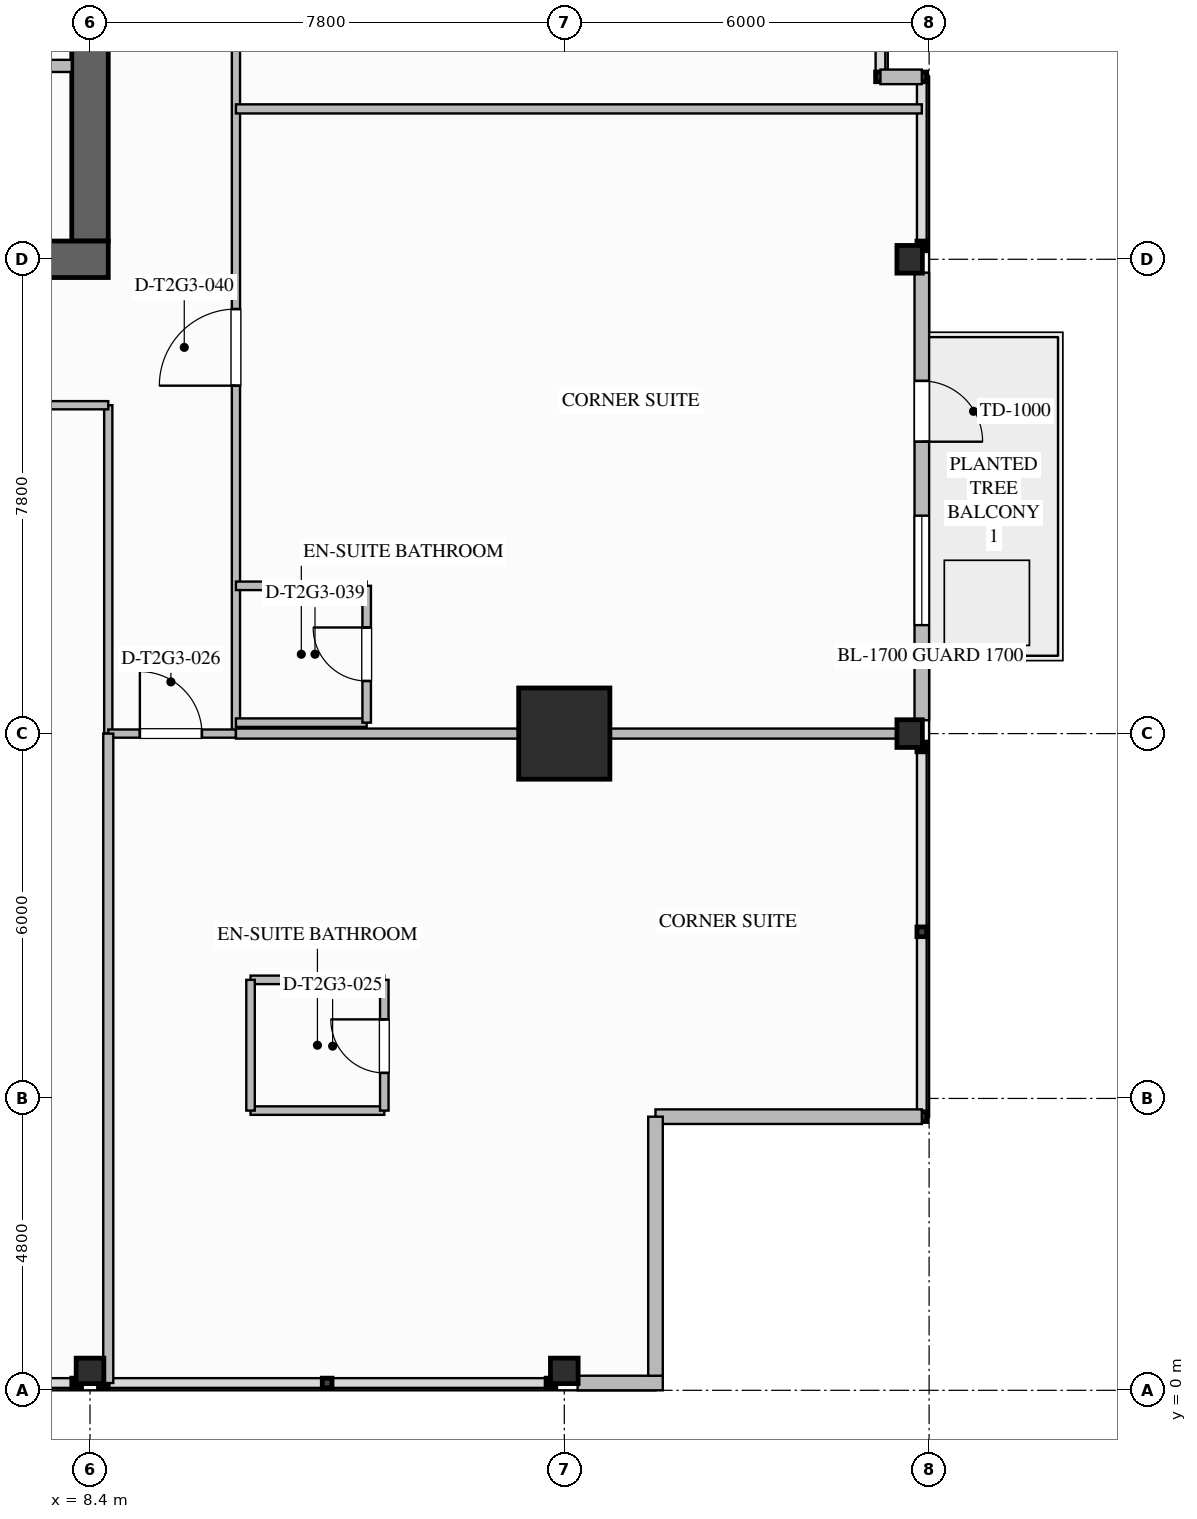
"""IFC4 building model, lengths in metres.
Left out: names, types, materials, properties, quantities, classifications, styles, units other than length and angle.
Written with IfcOpenShell. Run it as: python <this file> out.ifc"""

import sys

from ifc_helpers import new_model, si_unit, direction, frame, frame_2d, origin, origin_2d, place, context, subcontext, project, spatial, rectangle, i_section, extrude, element, fill, save


model = new_model("IFC4")
c1 = context("Model", 3, precision=1e-05, world=origin(), true_north=direction((0.0, 1.0)))
c2 = subcontext(c1, "Body", "Model", "MODEL_VIEW")
j1 = project(units=[si_unit("LENGTHUNIT", "METRE"), si_unit("PLANEANGLEUNIT", "RADIAN")], contexts=[c1])
p1 = place(None, origin())
s1 = spatial("IfcSite", under=j1, at=p1, CompositionType="ELEMENT")
p2 = place(p1, origin())
s2 = spatial("IfcBuilding", under=s1, at=p2, CompositionType="ELEMENT")
p3 = place(p2, frame((0.0, 0.0, 112.8)))
s3 = spatial("IfcBuildingStorey", under=s2, at=p3, CompositionType="ELEMENT", Elevation=112.8)
p4 = place(p3, frame((8.4, 35.1, 0.0), z_axis=(0.0, 0.0, 1.0), x_axis=(0.0, -1.0, 0.0)))
e1 = element("IfcWall", 1, at=p4, inside=s3, PredefinedType="SHEAR", context=c2, shape_type="SweptSolid", body=[
    extrude(rectangle(XDim=16.2, YDim=0.6, at=frame_2d((8.1, 0.0))), origin(), (0.0, 0.0, 1.0), 3.5),
])
p5 = place(p4, frame((3.08, 0.0, 0.0)))
e2 = element("IfcOpeningElement", 2, at=p5, cuts=e1, PredefinedType="OPENING", context=c2, shape_type="SweptSolid", body=[
    extrude(rectangle(XDim=1.12, YDim=2.1, at=frame_2d((0.56, 1.05))), frame((0.0, 0.31, 0.0), z_axis=(0.0, -1.0, 0.0), x_axis=(1.0, 0.0, 0.0)), (0.0, 0.0, 1.0), 0.62),
])
p6 = place(p4, frame((10.62, 0.0, 0.0)))
e3 = element("IfcOpeningElement", 3, at=p6, cuts=e1, PredefinedType="OPENING", context=c2, shape_type="SweptSolid", body=[
    extrude(rectangle(XDim=1.08, YDim=2.04, at=frame_2d((0.54, 1.02))), frame((0.0, 0.31, 0.0), z_axis=(0.0, -1.0, 0.0), x_axis=(1.0, 0.0, 0.0)), (0.0, 0.0, 1.0), 0.62),
])
p7 = place(p3, frame((8.7, 18.6, 0.0), z_axis=(0.0, 0.0, 1.0), x_axis=(-1.0, 0.0, 0.0)))
e4 = element("IfcWall", 4, at=p7, inside=s3, PredefinedType="SHEAR", context=c2, shape_type="SweptSolid", body=[
    extrude(rectangle(XDim=17.4, YDim=0.6, at=frame_2d((8.7, 0.0))), origin(), (0.0, 0.0, 1.0), 3.5),
])
p8 = place(p3, frame((16.2, 10.8, 0.0), z_axis=(0.0, 0.0, 1.0), x_axis=(1.0, 0.0, 0.0)))
e5 = element("IfcColumn", 5, at=p8, inside=s3, PredefinedType="COLUMN", context=c2, shape_type="SweptSolid", body=[
    extrude(rectangle(XDim=1.5, YDim=1.5, at=origin_2d()), origin(), (0.0, 0.0, 1.0), 3.5),
])
for number, where, z_axis, x_axis in (
    (6, (21.88, 10.8, 0.0), (0.0, 0.0, 1.0), (1.0, 0.0, 0.0)),
    (7, (21.88, 18.6, 0.0), (0.0, 0.0, 1.0), (1.0, 0.0, 0.0)),
    (8, (8.4, 0.32, 0.0), (0.0, 0.0, 1.0), (0.0, 1.0, 0.0)),
    (9, (16.2, 0.32, 0.0), (0.0, 0.0, 1.0), (0.0, 1.0, 0.0)),
):
    element("IfcColumn", number, at=place(p3, frame(where, z_axis=z_axis, x_axis=x_axis)), inside=s3, PredefinedType="COLUMN", context=c2, shape_type="SweptSolid", body=[
        extrude(i_section(OverallWidth=0.418, OverallDepth=0.455, WebThickness=0.042, FlangeThickness=0.068, FilletRadius=0.03, at=origin_2d()), origin(), (0.0, 0.0, 1.0), 3.497),
    ])
p9 = place(p3, frame((22.08, 18.38, 0.0), z_axis=(0.0, 0.0, 1.0), x_axis=(0.0, -1.0, 0.0)))
e10 = element("IfcWall", 10, at=p9, inside=s3, PredefinedType="STANDARD", context=c2, shape_type="SweptSolid", body=[
    extrude(rectangle(XDim=7.361, YDim=0.24, at=frame_2d((3.68, 0.0))), origin(), (0.0, 0.0, 1.0), 2.629),
])
p10 = place(p9, frame((1.781, 0.0, 0.0)))
e11 = element("IfcOpeningElement", 11, at=p10, cuts=e10, PredefinedType="OPENING", context=c2, shape_type="SweptSolid", body=[
    extrude(rectangle(XDim=1.0, YDim=2.2, at=frame_2d((0.5, 1.1))), frame((0.0, 0.13, 0.0), z_axis=(0.0, -1.0, 0.0), x_axis=(1.0, 0.0, 0.0)), (0.0, 0.0, 1.0), 0.26),
])
p11 = place(p9, frame((3.997, 0.0, 0.75)))
e12 = element("IfcOpeningElement", 12, at=p11, cuts=e10, PredefinedType="OPENING", context=c2, shape_type="SweptSolid", body=[
    extrude(rectangle(XDim=1.8, YDim=1.779, at=frame_2d((0.9, 0.89))), frame((0.0, 0.13, 0.0), z_axis=(0.0, -1.0, 0.0), x_axis=(1.0, 0.0, 0.0)), (0.0, 0.0, 1.0), 0.26),
])
p12 = place(p3, frame((17.82, 0.12, 0.0), z_axis=(0.0, 0.0, 1.0), x_axis=(-1.0, 0.0, 0.0)))
e13 = element("IfcWall", 13, at=p12, inside=s3, PredefinedType="STANDARD", context=c2, shape_type="SweptSolid", body=[
    extrude(rectangle(XDim=1.4, YDim=0.24, at=frame_2d((0.7, 0.0))), origin(), (0.0, 0.0, 1.0), 3.24),
])
p13 = place(p3, frame((22.08, 4.5, 0.0), z_axis=(0.0, 0.0, 1.0), x_axis=(-1.0, 0.0, 0.0)))
e14 = element("IfcWall", 14, at=p13, inside=s3, PredefinedType="STANDARD", context=c2, shape_type="SweptSolid", body=[
    extrude(rectangle(XDim=4.38, YDim=0.24, at=frame_2d((2.19, 0.0))), origin(), (0.0, 0.0, 1.0), 3.24),
])
p14 = place(p3, frame((17.7, 4.5, 0.0), z_axis=(0.0, 0.0, 1.0), x_axis=(0.0, -1.0, 0.0)))
e15 = element("IfcWall", 15, at=p14, inside=s3, PredefinedType="STANDARD", context=c2, shape_type="SweptSolid", body=[
    extrude(rectangle(XDim=4.26, YDim=0.24, at=frame_2d((2.13, 0.0))), origin(), (0.0, 0.0, 1.0), 3.24),
])
p15 = place(p3, frame((21.4, 21.6, 0.0), z_axis=(0.0, 0.0, 1.0), x_axis=(1.0, 0.0, 0.0)))
e16 = element("IfcWall", 16, at=p15, inside=s3, PredefinedType="STANDARD", context=c2, shape_type="SweptSolid", body=[
    extrude(rectangle(XDim=0.68, YDim=0.24, at=frame_2d((0.34, 0.0))), origin(), (0.0, 0.0, 1.0), 3.24),
])
p16 = place(p3, frame((8.1, 21.78, 0.0), z_axis=(0.0, 0.0, 1.0), x_axis=(-1.0, 0.0, 0.0)))
e17 = element("IfcWall", 17, at=p16, inside=s3, PredefinedType="SOLIDWALL", context=c2, shape_type="SweptSolid", body=[
    extrude(rectangle(XDim=7.55, YDim=0.2, at=frame_2d((3.775, 0.0))), origin(), (0.0, 0.0, 1.0), 3.24),
])
p17 = place(p16, frame((5.75, 0.0, 0.0)))
e18 = element("IfcOpeningElement", 18, at=p17, cuts=e17, PredefinedType="OPENING", context=c2, shape_type="SweptSolid", body=[
    extrude(rectangle(XDim=1.1, YDim=2.2, at=frame_2d((0.55, 1.1))), frame((0.0, 0.11, 0.0), z_axis=(0.0, -1.0, 0.0), x_axis=(1.0, 0.0, 0.0)), (0.0, 0.0, 1.0), 0.22),
])
p18 = place(p16, frame((3.35, 0.0, 0.0)))
e19 = element("IfcOpeningElement", 19, at=p18, cuts=e17, PredefinedType="OPENING", context=c2, shape_type="SweptSolid", body=[
    extrude(rectangle(XDim=1.1, YDim=2.2, at=frame_2d((0.55, 1.1))), frame((0.0, 0.11, 0.0), z_axis=(0.0, -1.0, 0.0), x_axis=(1.0, 0.0, 0.0)), (0.0, 0.0, 1.0), 0.22),
])
p19 = place(p16, frame((0.95, 0.0, 0.0)))
e20 = element("IfcOpeningElement", 20, at=p19, cuts=e17, PredefinedType="OPENING", context=c2, shape_type="SweptSolid", body=[
    extrude(rectangle(XDim=1.1, YDim=2.2, at=frame_2d((0.55, 1.1))), frame((0.0, 0.11, 0.0), z_axis=(0.0, -1.0, 0.0), x_axis=(1.0, 0.0, 0.0)), (0.0, 0.0, 1.0), 0.22),
])
p20 = place(p3, frame((8.7, 10.8, 0.0), z_axis=(0.0, 0.0, 1.0), x_axis=(0.0, 1.0, 0.0)))
e21 = element("IfcWall", 21, at=p20, inside=s3, PredefinedType="PARTITIONING", context=c2, shape_type="SweptSolid", body=[
    extrude(rectangle(XDim=5.4, YDim=0.135, at=frame_2d((2.7, 0.0))), origin(), (0.0, 0.0, 1.0), 3.24),
])
p21 = place(p3, frame((-16.2, 16.2, 0.0), z_axis=(0.0, 0.0, 1.0), x_axis=(1.0, 0.0, 0.0)))
e22 = element("IfcWall", 22, at=p21, inside=s3, PredefinedType="PARTITIONING", context=c2, shape_type="SweptSolid", body=[
    extrude(rectangle(XDim=24.9, YDim=0.135, at=frame_2d((12.45, 0.0))), origin(), (0.0, 0.0, 1.0), 3.24),
])
p22 = place(p21, frame((3.225, 0.0, 0.0)))
e23 = element("IfcOpeningElement", 23, at=p22, cuts=e22, PredefinedType="OPENING", context=c2, shape_type="SweptSolid", body=[
    extrude(rectangle(XDim=0.96, YDim=2.15, at=frame_2d((0.48, 1.075))), frame((0.0, 0.077, 0.0), z_axis=(0.0, -1.0, 0.0), x_axis=(1.0, 0.0, 0.0)), (0.0, 0.0, 1.0), 0.155),
])
p23 = place(p21, frame((8.205, 0.0, 0.0)))
e24 = element("IfcOpeningElement", 24, at=p23, cuts=e22, PredefinedType="OPENING", context=c2, shape_type="SweptSolid", body=[
    extrude(rectangle(XDim=1.02, YDim=2.15, at=frame_2d((0.51, 1.075))), frame((0.0, 0.077, 0.0), z_axis=(0.0, -1.0, 0.0), x_axis=(1.0, 0.0, 0.0)), (0.0, 0.0, 1.0), 0.155),
])
p24 = place(p21, frame((15.774, 0.0, 0.0)))
e25 = element("IfcOpeningElement", 25, at=p24, cuts=e22, PredefinedType="OPENING", context=c2, shape_type="SweptSolid", body=[
    extrude(rectangle(XDim=1.26, YDim=2.2, at=frame_2d((0.63, 1.1))), frame((0.0, 0.077, 0.0), z_axis=(0.0, -1.0, 0.0), x_axis=(1.0, 0.0, 0.0)), (0.0, 0.0, 1.0), 0.155),
])
p25 = place(p21, frame((20.904, 0.0, 0.0)))
e26 = element("IfcOpeningElement", 26, at=p25, cuts=e22, PredefinedType="OPENING", context=c2, shape_type="SweptSolid", body=[
    extrude(rectangle(XDim=1.02, YDim=2.15, at=frame_2d((0.51, 1.075))), frame((0.0, 0.077, 0.0), z_axis=(0.0, -1.0, 0.0), x_axis=(1.0, 0.0, 0.0)), (0.0, 0.0, 1.0), 0.155),
])
p26 = place(p3, frame((10.8, 10.8, 0.0), z_axis=(0.0, 0.0, 1.0), x_axis=(0.0, 1.0, 0.0)))
e27 = element("IfcWall", 27, at=p26, inside=s3, PredefinedType="PARTITIONING", context=c2, shape_type="SweptSolid", body=[
    extrude(rectangle(XDim=32.4, YDim=0.135, at=frame_2d((16.2, 0.0))), origin(), (0.0, 0.0, 1.0), 3.24),
])
p27 = place(p26, frame((5.722, 0.0, 0.0)))
e28 = element("IfcOpeningElement", 28, at=p27, cuts=e27, PredefinedType="OPENING", context=c2, shape_type="SweptSolid", body=[
    extrude(rectangle(XDim=1.26, YDim=2.2, at=frame_2d((0.63, 1.1))), frame((0.0, 0.077, 0.0), z_axis=(0.0, -1.0, 0.0), x_axis=(1.0, 0.0, 0.0)), (0.0, 0.0, 1.0), 0.155),
])
p28 = place(p26, frame((16.085, 0.0, 0.0)))
e29 = element("IfcOpeningElement", 29, at=p28, cuts=e27, PredefinedType="OPENING", context=c2, shape_type="SweptSolid", body=[
    extrude(rectangle(XDim=1.02, YDim=2.15, at=frame_2d((0.51, 1.075))), frame((0.0, 0.077, 0.0), z_axis=(0.0, -1.0, 0.0), x_axis=(1.0, 0.0, 0.0)), (0.0, 0.0, 1.0), 0.155),
])
p29 = place(p26, frame((28.244, 0.0, 0.0)))
e30 = element("IfcOpeningElement", 30, at=p29, cuts=e27, PredefinedType="OPENING", context=c2, shape_type="SweptSolid", body=[
    extrude(rectangle(XDim=1.26, YDim=2.2, at=frame_2d((0.63, 1.1))), frame((0.0, 0.077, 0.0), z_axis=(0.0, -1.0, 0.0), x_axis=(1.0, 0.0, 0.0)), (0.0, 0.0, 1.0), 0.155),
])
p30 = place(p3, frame((8.7, 10.8, 0.0), z_axis=(0.0, 0.0, 1.0), x_axis=(1.0, 0.0, 0.0)))
e31 = element("IfcWall", 31, at=p30, inside=s3, PredefinedType="PARTITIONING", context=c2, shape_type="SweptSolid", body=[
    extrude(rectangle(XDim=2.1, YDim=0.135, at=frame_2d((1.05, 0.0))), origin(), (0.0, 0.0, 1.0), 2.452),
])
p31 = place(p30, frame((0.52, 0.0, 0.0)))
e32 = element("IfcOpeningElement", 32, at=p31, cuts=e31, PredefinedType="OPENING", context=c2, shape_type="SweptSolid", body=[
    extrude(rectangle(XDim=1.02, YDim=2.15, at=frame_2d((0.51, 1.075))), frame((0.0, 0.077, 0.0), z_axis=(0.0, -1.0, 0.0), x_axis=(1.0, 0.0, 0.0)), (0.0, 0.0, 1.0), 0.155),
])
p32 = place(p3, frame((8.7, 0.12, 0.0), z_axis=(0.0, 0.0, 1.0), x_axis=(0.0, 1.0, 0.0)))
e33 = element("IfcWall", 33, at=p32, inside=s3, PredefinedType="PARTITIONING", context=c2, shape_type="SweptSolid", body=[
    extrude(rectangle(XDim=10.68, YDim=0.165, at=frame_2d((5.34, 0.0))), origin(), (0.0, 0.0, 1.0), 2.452),
])
p33 = place(p3, frame((10.8, 10.8, 0.0), z_axis=(0.0, 0.0, 1.0), x_axis=(1.0, 0.0, 0.0)))
e34 = element("IfcWall", 34, at=p33, inside=s3, PredefinedType="PARTITIONING", context=c2, shape_type="SweptSolid", body=[
    extrude(rectangle(XDim=11.28, YDim=0.165, at=frame_2d((5.64, 0.0))), origin(), (0.0, 0.0, 1.0), 2.452),
])
for number, where, z_axis, x_axis in (
    (35, (11.04, 4.6, 0.0), (0.0, 0.0, 1.0), (1.0, 0.0, 0.0)),
    (36, (11.04, 6.75, 0.0), (0.0, 0.0, 1.0), (1.0, 0.0, 0.0)),
):
    element("IfcWall", number, at=place(p3, frame(where, z_axis=z_axis, x_axis=x_axis)), inside=s3, PredefinedType="PLUMBINGWALL", context=c2, shape_type="SweptSolid", body=[
        extrude(rectangle(XDim=2.2, YDim=0.14, at=frame_2d((1.1, 0.0))), origin(), (0.0, 0.0, 1.0), 3.24),
    ])
p34 = place(p3, frame((11.04, 4.6, 0.0), z_axis=(0.0, 0.0, 1.0), x_axis=(0.0, 1.0, 0.0)))
e37 = element("IfcWall", 37, at=p34, inside=s3, PredefinedType="PLUMBINGWALL", context=c2, shape_type="SweptSolid", body=[
    extrude(rectangle(XDim=2.15, YDim=0.14, at=frame_2d((1.075, 0.0))), origin(), (0.0, 0.0, 1.0), 3.24),
])
p35 = place(p3, frame((13.24, 4.6, 0.0), z_axis=(0.0, 0.0, 1.0), x_axis=(0.0, 1.0, 0.0)))
e38 = element("IfcWall", 38, at=p35, inside=s3, PredefinedType="PLUMBINGWALL", context=c2, shape_type="SweptSolid", body=[
    extrude(rectangle(XDim=2.15, YDim=0.14, at=frame_2d((1.075, 0.0))), origin(), (0.0, 0.0, 1.0), 3.24),
])
p36 = place(p35, frame((0.62, 0.0, 0.0)))
e39 = element("IfcOpeningElement", 39, at=p36, cuts=e38, PredefinedType="OPENING", context=c2, shape_type="SweptSolid", body=[
    extrude(rectangle(XDim=0.88, YDim=2.1, at=frame_2d((0.44, 1.05))), frame((0.0, 0.08, 0.0), z_axis=(0.0, -1.0, 0.0), x_axis=(1.0, 0.0, 0.0)), (0.0, 0.0, 1.0), 0.16),
])
p37 = place(p3, frame((10.8, 10.98, 0.0), z_axis=(0.0, 0.0, 1.0), x_axis=(1.0, 0.0, 0.0)))
e40 = element("IfcWall", 40, at=p37, inside=s3, PredefinedType="PLUMBINGWALL", context=c2, shape_type="SweptSolid", body=[
    extrude(rectangle(XDim=2.15, YDim=0.14, at=frame_2d((1.075, 0.0))), origin(), (0.0, 0.0, 1.0), 2.452),
])
p38 = place(p3, frame((10.8, 13.23, 0.0), z_axis=(0.0, 0.0, 1.0), x_axis=(1.0, 0.0, 0.0)))
e41 = element("IfcWall", 41, at=p38, inside=s3, PredefinedType="PLUMBINGWALL", context=c2, shape_type="SweptSolid", body=[
    extrude(rectangle(XDim=2.15, YDim=0.14, at=frame_2d((1.075, 0.0))), origin(), (0.0, 0.0, 1.0), 3.24),
])
p39 = place(p3, frame((12.95, 10.98, 0.0), z_axis=(0.0, 0.0, 1.0), x_axis=(0.0, 1.0, 0.0)))
e42 = element("IfcWall", 42, at=p39, inside=s3, PredefinedType="PLUMBINGWALL", context=c2, shape_type="SweptSolid", body=[
    extrude(rectangle(XDim=2.25, YDim=0.14, at=frame_2d((1.125, 0.0))), origin(), (0.0, 0.0, 1.0), 3.24),
])
p40 = place(p39, frame((0.685, 0.0, 0.0)))
e43 = element("IfcOpeningElement", 43, at=p40, cuts=e42, PredefinedType="OPENING", context=c2, shape_type="SweptSolid", body=[
    extrude(rectangle(XDim=0.88, YDim=2.1, at=frame_2d((0.44, 1.05))), frame((0.0, 0.08, 0.0), z_axis=(0.0, -1.0, 0.0), x_axis=(1.0, 0.0, 0.0)), (0.0, 0.0, 1.0), 0.16),
])
p41 = place(p3, frame((10.8, 21.073, 0.0), z_axis=(0.0, 0.0, 1.0), x_axis=(1.0, 0.0, 0.0)))
e44 = element("IfcWall", 44, at=p41, inside=s3, PredefinedType="PARTITIONING", context=c2, shape_type="SweptSolid", body=[
    extrude(rectangle(XDim=11.28, YDim=0.15, at=frame_2d((5.64, 0.0))), origin(), (0.0, 0.0, 1.0), 3.24),
])
p42 = place(p10, origin())
e45 = element("IfcDoor", 45, at=p42, inside=s3, OperationType="SINGLE_SWING_RIGHT", PredefinedType="DOOR", context=c2, shape_type="SweptSolid", body=[
    extrude(rectangle(XDim=1.0, YDim=2.2, at=frame_2d((0.5, 1.1))), frame((0.0, 0.025, 0.0), z_axis=(0.0, -1.0, 0.0), x_axis=(1.0, 0.0, 0.0)), (0.0, 0.0, 1.0), 0.05),
])
fill(e11, e45)
p43 = place(p11, origin())
e46 = element("IfcWindow", 46, at=p43, inside=s3, PartitioningType="SINGLE_PANEL", PredefinedType="WINDOW", context=c2, shape_type="SweptSolid", body=[
    extrude(rectangle(XDim=1.8, YDim=1.779, at=frame_2d((0.9, 0.89))), frame((0.0, 0.03, 0.0), z_axis=(0.0, -1.0, 0.0), x_axis=(1.0, 0.0, 0.0)), (0.0, 0.0, 1.0), 0.06),
])
fill(e12, e46)
p44 = place(p36, origin())
e47 = element("IfcDoor", 47, at=p44, inside=s3, OperationType="SINGLE_SWING_RIGHT", PredefinedType="DOOR", context=c2, shape_type="SweptSolid", body=[
    extrude(rectangle(XDim=0.88, YDim=2.1, at=frame_2d((0.44, 1.05))), frame((0.0, 0.025, 0.0), z_axis=(0.0, -1.0, 0.0), x_axis=(1.0, 0.0, 0.0)), (0.0, 0.0, 1.0), 0.05),
])
fill(e39, e47)
p45 = place(p31, origin())
e48 = element("IfcDoor", 48, at=p45, inside=s3, OperationType="SINGLE_SWING_LEFT", PredefinedType="DOOR", context=c2, shape_type="SweptSolid", body=[
    extrude(rectangle(XDim=1.02, YDim=2.15, at=frame_2d((0.51, 1.075))), frame((0.0, 0.025, 0.0), z_axis=(0.0, -1.0, 0.0), x_axis=(1.0, 0.0, 0.0)), (0.0, 0.0, 1.0), 0.05),
])
fill(e32, e48)
p46 = place(p40, origin())
e49 = element("IfcDoor", 49, at=p46, inside=s3, OperationType="SINGLE_SWING_RIGHT", PredefinedType="DOOR", context=c2, shape_type="SweptSolid", body=[
    extrude(rectangle(XDim=0.88, YDim=2.1, at=frame_2d((0.44, 1.05))), frame((0.0, 0.025, 0.0), z_axis=(0.0, -1.0, 0.0), x_axis=(1.0, 0.0, 0.0)), (0.0, 0.0, 1.0), 0.05),
])
fill(e43, e49)
p47 = place(p27, origin())
e50 = element("IfcDoor", 50, at=p47, inside=s3, OperationType="SINGLE_SWING_LEFT", PredefinedType="DOOR", context=c2, shape_type="SweptSolid", body=[
    extrude(rectangle(XDim=1.26, YDim=2.2, at=frame_2d((0.63, 1.1))), frame((0.0, 0.025, 0.0), z_axis=(0.0, -1.0, 0.0), x_axis=(1.0, 0.0, 0.0)), (0.0, 0.0, 1.0), 0.05),
])
fill(e28, e50)
save(model, sys.argv[1])
